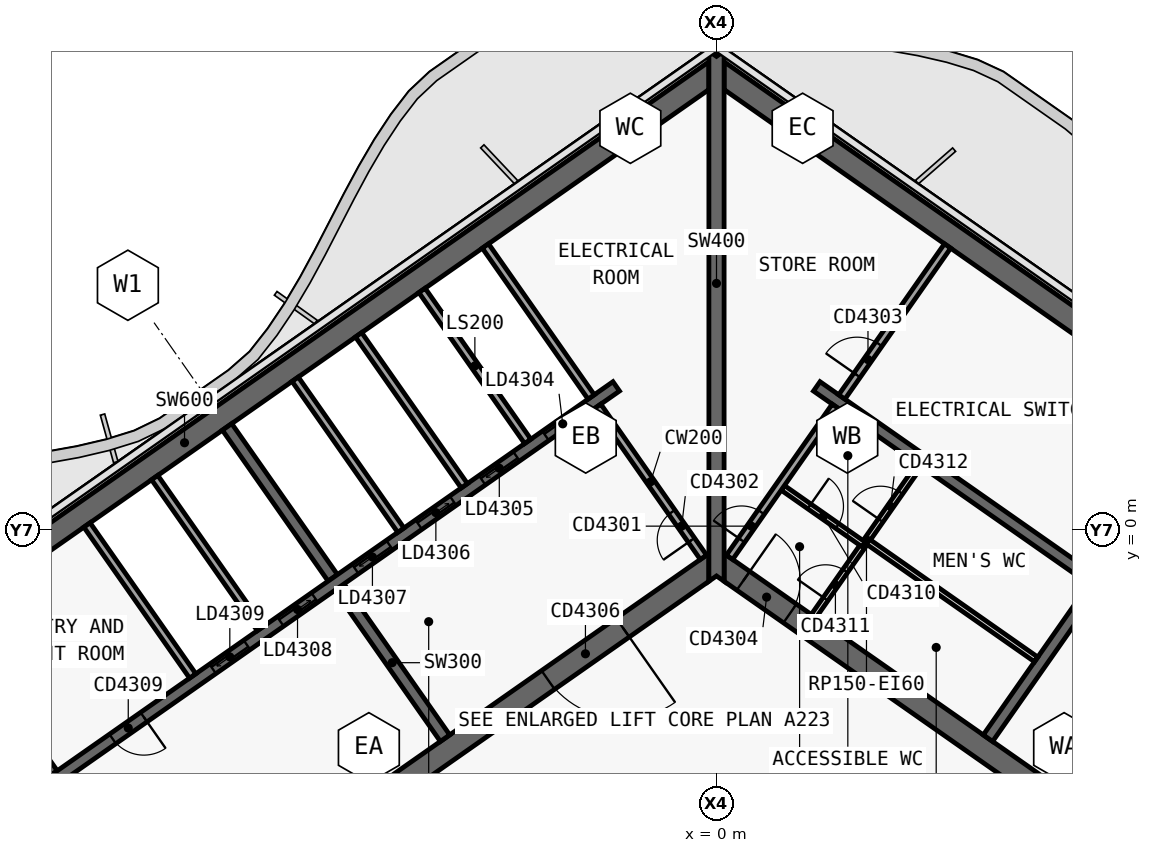
"""IFC4 building model, lengths in metres.
Left out: names, types, materials, properties, quantities, classifications, styles, units other than length and angle.
Written with IfcOpenShell. Run it as: python <this file> out.ifc"""

import sys

from ifc_helpers import new_model, si_unit, direction, frame, frame_2d, origin, place, context, subcontext, project, spatial, polyline, rectangle, outline, extrude, element, fill, save


model = new_model("IFC4")
c1 = context("Model", 3, precision=1e-05, world=origin(), true_north=direction((0.0, 1.0)))
c2 = subcontext(c1, "Body", "Model", "MODEL_VIEW")
j1 = project(units=[si_unit("LENGTHUNIT", "METRE"), si_unit("PLANEANGLEUNIT", "RADIAN")], contexts=[c1])
p1 = place(None, origin())
s1 = spatial("IfcSite", under=j1, at=p1, CompositionType="ELEMENT")
p2 = place(p1, origin())
s2 = spatial("IfcBuilding", under=s1, at=p2, CompositionType="ELEMENT")
p3 = place(p2, frame((0.0, 0.0, 241.0)))
s3 = spatial("IfcBuildingStorey", under=s2, at=p3, CompositionType="ELEMENT", Elevation=241.0)
p4 = place(p3, frame((-0.028, 12.066, 0.0), z_axis=(0.0, 0.0, 1.0), x_axis=(-0.819151382952, -0.573577380837, 0.0)))
e1 = element("IfcWall", 1, at=p4, inside=s3, PredefinedType="SHEAR", context=c2, shape_type="SweptSolid", body=[
    extrude(outline(polyline([(33.898, 0.3), (0.42, 0.3), (0.0, -0.3), (33.898, -0.3), (33.898, 0.3)])), origin(), (0.0, 0.0, 1.0), 3.9),
])
p5 = place(p3, frame((-0.028, -0.874, 0.0), z_axis=(0.0, 0.0, 1.0), x_axis=(-0.819150035022, -0.573579305871, 0.0)))
e2 = element("IfcWall", 2, at=p5, inside=s3, PredefinedType="SHEAR", context=c2, shape_type="SweptSolid", body=[
    extrude(outline(polyline([(26.476, 0.3), (0.42, 0.3), (0.0, -0.3), (26.476, -0.3), (26.476, 0.3)])), origin(), (0.0, 0.0, 1.0), 3.9),
])
p6 = place(p5, frame((2.976, 0.0, 0.0)))
e3 = element("IfcOpeningElement", 3, at=p6, cuts=e2, PredefinedType="OPENING", context=c2, shape_type="SweptSolid", body=[
    extrude(rectangle(XDim=2.4, YDim=2.1, at=frame_2d((1.2, 1.05))), frame((0.0, 0.31, 0.0), z_axis=(0.0, -1.0, 0.0), x_axis=(1.0, 0.0, 0.0)), (0.0, 0.0, 1.0), 0.62),
])
p7 = place(p5, frame((11.776, 0.0, 0.0)))
e4 = element("IfcOpeningElement", 4, at=p7, cuts=e2, PredefinedType="OPENING", context=c2, shape_type="SweptSolid", body=[
    extrude(rectangle(XDim=2.4, YDim=2.1, at=frame_2d((1.2, 1.05))), frame((0.0, 0.31, 0.0), z_axis=(0.0, -1.0, 0.0), x_axis=(1.0, 0.0, 0.0)), (0.0, 0.0, 1.0), 0.62),
])
p8 = place(p3, frame((-7.143, -5.49, 0.0), z_axis=(0.0, 0.0, 1.0), x_axis=(-0.573617744349, 0.819123118565, 0.0)))
e5 = element("IfcWall", 5, at=p8, inside=s3, PredefinedType="SHEAR", context=c2, shape_type="SweptSolid", body=[
    extrude(outline(polyline([(4.85, 0.15), (0.0, 0.15), (0.0, -0.15), (4.85, -0.15), (4.85, 0.15)])), origin(), (0.0, 0.0, 1.0), 3.9),
])
p9 = place(p3, frame((-10.097, -1.271, 0.0), z_axis=(0.0, 0.0, 1.0), x_axis=(-0.573560315113, 0.819163332265, 0.0)))
e6 = element("IfcWall", 6, at=p9, inside=s3, PredefinedType="SHEAR", context=c2, shape_type="SweptSolid", body=[
    extrude(outline(polyline([(4.85, -0.15), (4.85, 0.15), (0.0, 0.15), (0.0, -0.15), (4.85, -0.15)])), origin(), (0.0, 0.0, 1.0), 3.9),
])
p10 = place(p3, frame((-17.469, -6.433, 0.0), z_axis=(0.0, 0.0, 1.0), x_axis=(-0.573594092424, 0.81913968109, 0.0)))
e7 = element("IfcWall", 7, at=p10, inside=s3, PredefinedType="SHEAR", context=c2, shape_type="SweptSolid", body=[
    extrude(outline(polyline([(4.85, -0.15), (4.85, 0.15), (0.0, 0.15), (0.0, -0.15), (4.85, -0.15)])), origin(), (0.0, 0.0, 1.0), 3.9),
])
p11 = place(p3, frame((-2.638, 3.768, 0.0), z_axis=(0.0, 0.0, 1.0), x_axis=(-0.819155014212, -0.573572194837, 0.0)))
e8 = element("IfcWall", 8, at=p11, inside=s3, PredefinedType="SHEAR", context=c2, shape_type="SweptSolid", body=[
    extrude(outline(polyline([(26.4, 0.15), (0.0, 0.15), (0.0, -0.15), (26.4, -0.15), (26.4, 0.15)])), origin(), (0.0, 0.0, 1.0), 3.9),
])
p12 = place(p11, frame((1.169, 0.0, 0.0)))
e9 = element("IfcOpeningElement", 9, at=p12, cuts=e8, PredefinedType="OPENING", context=c2, shape_type="SweptSolid", body=[
    extrude(rectangle(XDim=1.1, YDim=2.1, at=frame_2d((0.55, 1.05))), frame((0.0, 0.16, 0.0), z_axis=(0.0, -1.0, 0.0), x_axis=(1.0, 0.0, 0.0)), (0.0, 0.0, 1.0), 0.32),
])
p13 = place(p11, frame((3.206, 0.0, 0.0)))
e10 = element("IfcOpeningElement", 10, at=p13, cuts=e8, PredefinedType="OPENING", context=c2, shape_type="SweptSolid", body=[
    extrude(rectangle(XDim=1.1, YDim=2.1, at=frame_2d((0.55, 1.05))), frame((0.0, 0.16, 0.0), z_axis=(0.0, -1.0, 0.0), x_axis=(1.0, 0.0, 0.0)), (0.0, 0.0, 1.0), 0.32),
])
p14 = place(p11, frame((5.244, 0.0, 0.0)))
e11 = element("IfcOpeningElement", 11, at=p14, cuts=e8, PredefinedType="OPENING", context=c2, shape_type="SweptSolid", body=[
    extrude(rectangle(XDim=1.1, YDim=2.1, at=frame_2d((0.55, 1.05))), frame((0.0, 0.16, 0.0), z_axis=(0.0, -1.0, 0.0), x_axis=(1.0, 0.0, 0.0)), (0.0, 0.0, 1.0), 0.32),
])
p15 = place(p11, frame((7.281, 0.0, 0.0)))
e12 = element("IfcOpeningElement", 12, at=p15, cuts=e8, PredefinedType="OPENING", context=c2, shape_type="SweptSolid", body=[
    extrude(rectangle(XDim=1.1, YDim=2.1, at=frame_2d((0.55, 1.05))), frame((0.0, 0.16, 0.0), z_axis=(0.0, -1.0, 0.0), x_axis=(1.0, 0.0, 0.0)), (0.0, 0.0, 1.0), 0.32),
])
p16 = place(p11, frame((9.688, 0.0, 0.0)))
e13 = element("IfcOpeningElement", 13, at=p16, cuts=e8, PredefinedType="OPENING", context=c2, shape_type="SweptSolid", body=[
    extrude(rectangle(XDim=1.1, YDim=2.1, at=frame_2d((0.55, 1.05))), frame((0.0, 0.16, 0.0), z_axis=(0.0, -1.0, 0.0), x_axis=(1.0, 0.0, 0.0)), (0.0, 0.0, 1.0), 0.32),
])
p17 = place(p11, frame((11.863, 0.0, 0.0)))
e14 = element("IfcOpeningElement", 14, at=p17, cuts=e8, PredefinedType="OPENING", context=c2, shape_type="SweptSolid", body=[
    extrude(rectangle(XDim=1.1, YDim=2.1, at=frame_2d((0.55, 1.05))), frame((0.0, 0.16, 0.0), z_axis=(0.0, -1.0, 0.0), x_axis=(1.0, 0.0, 0.0)), (0.0, 0.0, 1.0), 0.32),
])
p18 = place(p11, frame((15.175, 0.0, 0.0)))
e15 = element("IfcOpeningElement", 15, at=p18, cuts=e8, PredefinedType="OPENING", context=c2, shape_type="SweptSolid", body=[
    extrude(rectangle(XDim=1.0, YDim=2.1, at=frame_2d((0.5, 1.05))), frame((0.0, 0.16, 0.0), z_axis=(0.0, -1.0, 0.0), x_axis=(1.0, 0.0, 0.0)), (0.0, 0.0, 1.0), 0.32),
])
p19 = place(p3, frame((0.028, 12.066, 0.0), z_axis=(0.0, 0.0, 1.0), x_axis=(0.819151382952, -0.573577380837, 0.0)))
e16 = element("IfcWall", 16, at=p19, inside=s3, PredefinedType="SHEAR", context=c2, shape_type="SweptSolid", body=[
    extrude(outline(polyline([(33.898, 0.3), (0.0, 0.3), (0.42, -0.3), (33.898, -0.3), (33.898, 0.3)])), origin(), (0.0, 0.0, 1.0), 3.9),
])
p20 = place(p3, frame((0.028, -0.874, 0.0), z_axis=(0.0, 0.0, 1.0), x_axis=(0.819150035022, -0.573579305871, 0.0)))
e17 = element("IfcWall", 17, at=p20, inside=s3, PredefinedType="SHEAR", context=c2, shape_type="SweptSolid", body=[
    extrude(outline(polyline([(26.476, 0.3), (0.0, 0.3), (0.42, -0.3), (26.476, -0.3), (26.476, 0.3)])), origin(), (0.0, 0.0, 1.0), 3.9),
])
p21 = place(p20, frame((0.826, 0.0, 0.0)))
e18 = element("IfcOpeningElement", 18, at=p21, cuts=e17, PredefinedType="OPENING", context=c2, shape_type="SweptSolid", body=[
    extrude(rectangle(XDim=1.5, YDim=2.1, at=frame_2d((0.75, 1.05))), frame((0.0, 0.31, 0.0), z_axis=(0.0, -1.0, 0.0), x_axis=(1.0, 0.0, 0.0)), (0.0, 0.0, 1.0), 0.62),
])
p22 = place(p20, frame((12.226, 0.0, 0.0)))
e19 = element("IfcOpeningElement", 19, at=p22, cuts=e17, PredefinedType="OPENING", context=c2, shape_type="SweptSolid", body=[
    extrude(rectangle(XDim=1.5, YDim=2.1, at=frame_2d((0.75, 1.05))), frame((0.0, 0.31, 0.0), z_axis=(0.0, -1.0, 0.0), x_axis=(1.0, 0.0, 0.0)), (0.0, 0.0, 1.0), 0.62),
])
p23 = place(p3, frame((7.143, -5.49, 0.0), z_axis=(0.0, 0.0, 1.0), x_axis=(0.573617744349, 0.819123118565, 0.0)))
e20 = element("IfcWall", 20, at=p23, inside=s3, PredefinedType="SHEAR", context=c2, shape_type="SweptSolid", body=[
    extrude(outline(polyline([(0.0, 0.15), (0.0, -0.15), (4.85, -0.15), (4.85, 0.15), (0.0, 0.15)])), origin(), (0.0, 0.0, 1.0), 3.9),
])
p24 = place(p3, frame((2.638, 3.768, 0.0), z_axis=(0.0, 0.0, 1.0), x_axis=(0.819155014212, -0.573572194837, 0.0)))
e21 = element("IfcWall", 21, at=p24, inside=s3, PredefinedType="SHEAR", context=c2, shape_type="SweptSolid", body=[
    extrude(outline(polyline([(0.0, 0.15), (0.0, -0.15), (26.4, -0.15), (26.4, 0.15), (0.0, 0.15)])), origin(), (0.0, 0.0, 1.0), 3.9),
])
p25 = place(p24, frame((9.637, 0.0, 0.0)))
e22 = element("IfcOpeningElement", 22, at=p25, cuts=e21, PredefinedType="OPENING", context=c2, shape_type="SweptSolid", body=[
    extrude(rectangle(XDim=1.2, YDim=2.1, at=frame_2d((0.6, 1.05))), frame((0.0, 0.16, 0.0), z_axis=(0.0, -1.0, 0.0), x_axis=(1.0, 0.0, 0.0)), (0.0, 0.0, 1.0), 0.32),
])
p26 = place(p24, frame((11.812, 0.0, 0.0)))
e23 = element("IfcOpeningElement", 23, at=p26, cuts=e21, PredefinedType="OPENING", context=c2, shape_type="SweptSolid", body=[
    extrude(rectangle(XDim=1.2, YDim=2.1, at=frame_2d((0.6, 1.05))), frame((0.0, 0.16, 0.0), z_axis=(0.0, -1.0, 0.0), x_axis=(1.0, 0.0, 0.0)), (0.0, 0.0, 1.0), 0.32),
])
p27 = place(p24, frame((13.988, 0.0, 0.0)))
e24 = element("IfcOpeningElement", 24, at=p27, cuts=e21, PredefinedType="OPENING", context=c2, shape_type="SweptSolid", body=[
    extrude(rectangle(XDim=1.2, YDim=2.1, at=frame_2d((0.6, 1.05))), frame((0.0, 0.16, 0.0), z_axis=(0.0, -1.0, 0.0), x_axis=(1.0, 0.0, 0.0)), (0.0, 0.0, 1.0), 0.32),
])
p28 = place(p24, frame((16.262, 0.0, 0.0)))
e25 = element("IfcOpeningElement", 25, at=p28, cuts=e21, PredefinedType="OPENING", context=c2, shape_type="SweptSolid", body=[
    extrude(rectangle(XDim=1.0, YDim=2.1, at=frame_2d((0.5, 1.05))), frame((0.0, 0.16, 0.0), z_axis=(0.0, -1.0, 0.0), x_axis=(1.0, 0.0, 0.0)), (0.0, 0.0, 1.0), 0.32),
])
p29 = place(p3, frame((0.0, -1.361, 0.0), z_axis=(0.0, 0.0, 1.0), x_axis=(0.0, 1.0, 0.0)))
e26 = element("IfcWall", 26, at=p29, inside=s3, PredefinedType="SHEAR", context=c2, shape_type="SweptSolid", body=[
    extrude(outline(polyline([(0.14, 0.2), (0.0, 0.2), (0.14, 0.0), (0.0, -0.2), (0.14, -0.2), (1.012, -0.2), (12.94, -0.2), (13.813, -0.2), (13.893, -0.2), (13.933, -0.172), (13.813, 0.0), (13.933, 0.172), (13.893, 0.2), (13.813, 0.2), (12.94, 0.2), (1.012, 0.2), (0.14, 0.2)])), origin(), (0.0, 0.0, 1.0), 3.9),
])
p30 = place(p3, frame((-4.967, 2.321, 0.0), z_axis=(0.0, 0.0, 1.0), x_axis=(-0.573594092424, 0.81913968109, 0.0)))
e27 = element("IfcWall", 27, at=p30, inside=s3, PredefinedType="SOLIDWALL", context=c2, shape_type="SweptSolid", body=[
    extrude(rectangle(XDim=4.85, YDim=0.2, at=frame_2d((2.425, 0.0))), origin(), (0.0, 0.0, 1.0), 3.9),
])
p31 = place(p3, frame((-6.636, 1.152, 0.0), z_axis=(0.0, 0.0, 1.0), x_axis=(-0.573560315113, 0.819163332265, 0.0)))
e28 = element("IfcWall", 28, at=p31, inside=s3, PredefinedType="SOLIDWALL", context=c2, shape_type="SweptSolid", body=[
    extrude(rectangle(XDim=4.85, YDim=0.2, at=frame_2d((2.425, 0.0))), origin(), (0.0, 0.0, 1.0), 3.9),
])
p32 = place(p3, frame((-8.305, -0.017, 0.0), z_axis=(0.0, 0.0, 1.0), x_axis=(-0.573594092424, 0.81913968109, 0.0)))
e29 = element("IfcWall", 29, at=p32, inside=s3, PredefinedType="SOLIDWALL", context=c2, shape_type="SweptSolid", body=[
    extrude(rectangle(XDim=4.85, YDim=0.2, at=frame_2d((2.425, 0.0))), origin(), (0.0, 0.0, 1.0), 3.9),
])
p33 = place(p3, frame((-12.001, -2.605, 0.0), z_axis=(0.0, 0.0, 1.0), x_axis=(-0.573560315113, 0.819163332265, 0.0)))
e30 = element("IfcWall", 30, at=p33, inside=s3, PredefinedType="SOLIDWALL", context=c2, shape_type="SweptSolid", body=[
    extrude(rectangle(XDim=4.85, YDim=0.2, at=frame_2d((2.425, 0.0))), origin(), (0.0, 0.0, 1.0), 3.9),
])
p34 = place(p3, frame((-13.783, -3.852, 0.0), z_axis=(0.0, 0.0, 1.0), x_axis=(-0.573594092424, 0.81913968109, 0.0)))
e31 = element("IfcWall", 31, at=p34, inside=s3, PredefinedType="SOLIDWALL", context=c2, shape_type="SweptSolid", body=[
    extrude(rectangle(XDim=4.85, YDim=0.2, at=frame_2d((2.425, 0.0))), origin(), (0.0, 0.0, 1.0), 3.9),
])
p35 = place(p3, frame((2.556, -2.278, 0.0), z_axis=(0.0, 0.0, 1.0), x_axis=(0.573560315113, 0.819163332265, 0.0)))
e32 = element("IfcWall", 32, at=p35, inside=s3, PredefinedType="PARTITIONING", context=c2, shape_type="SweptSolid", body=[
    extrude(rectangle(XDim=4.85, YDim=0.15, at=frame_2d((2.425, 0.0))), origin(), (0.0, 0.0, 1.0), 3.62),
])
p36 = place(p35, frame((0.55, 0.0, 0.0)))
e33 = element("IfcOpeningElement", 33, at=p36, cuts=e32, PredefinedType="OPENING", context=c2, shape_type="SweptSolid", body=[
    extrude(rectangle(XDim=0.9, YDim=2.1, at=frame_2d((0.45, 1.05))), frame((0.0, 0.085, 0.0), z_axis=(0.0, -1.0, 0.0), x_axis=(1.0, 0.0, 0.0)), (0.0, 0.0, 1.0), 0.17),
])
p37 = place(p35, frame((3.075, 0.0, 0.0)))
e34 = element("IfcOpeningElement", 34, at=p37, cuts=e32, PredefinedType="OPENING", context=c2, shape_type="SweptSolid", body=[
    extrude(rectangle(XDim=0.9, YDim=2.1, at=frame_2d((0.45, 1.05))), frame((0.0, 0.085, 0.0), z_axis=(0.0, -1.0, 0.0), x_axis=(1.0, 0.0, 0.0)), (0.0, 0.0, 1.0), 0.17),
])
p38 = place(p3, frame((1.745, 1.097, 0.0), z_axis=(0.0, 0.0, 1.0), x_axis=(0.819178980414, -0.573537965655, 0.0)))
e35 = element("IfcWall", 35, at=p38, inside=s3, PredefinedType="PARTITIONING", context=c2, shape_type="SweptSolid", body=[
    extrude(rectangle(XDim=2.6, YDim=0.15, at=frame_2d((1.3, 0.0))), origin(), (0.0, 0.0, 1.0), 3.62),
])
p39 = place(p38, frame((0.85, 0.0, 0.0)))
e36 = element("IfcOpeningElement", 36, at=p39, cuts=e35, PredefinedType="OPENING", context=c2, shape_type="SweptSolid", body=[
    extrude(rectangle(XDim=0.9, YDim=2.1, at=frame_2d((0.45, 1.05))), frame((0.0, 0.085, 0.0), z_axis=(0.0, -1.0, 0.0), x_axis=(1.0, 0.0, 0.0)), (0.0, 0.0, 1.0), 0.17),
])
p40 = place(p3, frame((3.947, -0.292, 0.0), z_axis=(0.0, 0.0, 1.0), x_axis=(0.819151939971, -0.573576585332, 0.0)))
e37 = element("IfcWall", 37, at=p40, inside=s3, PredefinedType="PARTITIONING", context=c2, shape_type="SweptSolid", body=[
    extrude(rectangle(XDim=5.45, YDim=0.15, at=frame_2d((2.725, 0.0))), origin(), (0.0, 0.0, 1.0), 3.62),
])
p41 = place(p3, frame((-0.344, -0.729, 0.0), z_axis=(0.0, 0.0, 1.0), x_axis=(-0.573560315113, 0.819163332265, 0.0)))
e38 = element("IfcWall", 38, at=p41, inside=s3, PredefinedType="SOLIDWALL", context=c2, shape_type="SweptSolid", body=[
    extrude(rectangle(XDim=4.85, YDim=0.2, at=frame_2d((2.425, 0.0))), origin(), (0.0, 0.0, 1.0), 3.62),
])
p42 = place(p41, frame((0.55, 0.0, 0.0)))
e39 = element("IfcOpeningElement", 39, at=p42, cuts=e38, PredefinedType="OPENING", context=c2, shape_type="SweptSolid", body=[
    extrude(rectangle(XDim=0.9, YDim=2.1, at=frame_2d((0.45, 1.05))), frame((0.0, 0.11, 0.0), z_axis=(0.0, -1.0, 0.0), x_axis=(1.0, 0.0, 0.0)), (0.0, 0.0, 1.0), 0.22),
])
p43 = place(p3, frame((-3.298, 3.49, 0.0), z_axis=(0.0, 0.0, 1.0), x_axis=(-0.573560315113, 0.819163332265, 0.0)))
e40 = element("IfcWall", 40, at=p43, inside=s3, PredefinedType="SOLIDWALL", context=c2, shape_type="SweptSolid", body=[
    extrude(rectangle(XDim=4.85, YDim=0.2, at=frame_2d((2.425, 0.0))), origin(), (0.0, 0.0, 1.0), 3.62),
])
p44 = place(p3, frame((0.344, -0.729, 0.0), z_axis=(0.0, 0.0, 1.0), x_axis=(0.573560315113, 0.819163332265, 0.0)))
e41 = element("IfcWall", 41, at=p44, inside=s3, PredefinedType="SOLIDWALL", context=c2, shape_type="SweptSolid", body=[
    extrude(rectangle(XDim=4.85, YDim=0.2, at=frame_2d((2.425, 0.0))), origin(), (0.0, 0.0, 1.0), 3.62),
])
p45 = place(p44, frame((0.55, 0.0, 0.0)))
e42 = element("IfcOpeningElement", 42, at=p45, cuts=e41, PredefinedType="OPENING", context=c2, shape_type="SweptSolid", body=[
    extrude(rectangle(XDim=0.9, YDim=2.1, at=frame_2d((0.45, 1.05))), frame((0.0, 0.11, 0.0), z_axis=(0.0, -1.0, 0.0), x_axis=(1.0, 0.0, 0.0)), (0.0, 0.0, 1.0), 0.22),
])
p46 = place(p3, frame((3.298, 3.49, 0.0), z_axis=(0.0, 0.0, 1.0), x_axis=(0.573560315113, 0.819163332265, 0.0)))
e43 = element("IfcWall", 43, at=p46, inside=s3, PredefinedType="SOLIDWALL", context=c2, shape_type="SweptSolid", body=[
    extrude(rectangle(XDim=4.85, YDim=0.2, at=frame_2d((2.425, 0.0))), origin(), (0.0, 0.0, 1.0), 3.62),
])
p47 = place(p46, frame((0.7, 0.0, 0.0)))
e44 = element("IfcOpeningElement", 44, at=p47, cuts=e43, PredefinedType="OPENING", context=c2, shape_type="SweptSolid", body=[
    extrude(rectangle(XDim=1.0, YDim=2.1, at=frame_2d((0.5, 1.05))), frame((0.0, 0.11, 0.0), z_axis=(0.0, -1.0, 0.0), x_axis=(1.0, 0.0, 0.0)), (0.0, 0.0, 1.0), 0.22),
])
p48 = place(p12, origin())
e45 = element("IfcDoor", 45, at=p48, inside=s3, OperationType="SLIDING_TO_LEFT", PredefinedType="DOOR", context=c2, shape_type="SweptSolid", body=[
    extrude(rectangle(XDim=1.1, YDim=2.1, at=frame_2d((0.55, 1.05))), frame((0.0, 0.025, 0.0), z_axis=(0.0, -1.0, 0.0), x_axis=(1.0, 0.0, 0.0)), (0.0, 0.0, 1.0), 0.05),
])
fill(e9, e45)
p49 = place(p13, origin())
e46 = element("IfcDoor", 46, at=p49, inside=s3, OperationType="SLIDING_TO_RIGHT", PredefinedType="DOOR", context=c2, shape_type="SweptSolid", body=[
    extrude(rectangle(XDim=1.1, YDim=2.1, at=frame_2d((0.55, 1.05))), frame((0.0, 0.025, 0.0), z_axis=(0.0, -1.0, 0.0), x_axis=(1.0, 0.0, 0.0)), (0.0, 0.0, 1.0), 0.05),
])
fill(e10, e46)
p50 = place(p14, origin())
e47 = element("IfcDoor", 47, at=p50, inside=s3, OperationType="SLIDING_TO_LEFT", PredefinedType="DOOR", context=c2, shape_type="SweptSolid", body=[
    extrude(rectangle(XDim=1.1, YDim=2.1, at=frame_2d((0.55, 1.05))), frame((0.0, 0.025, 0.0), z_axis=(0.0, -1.0, 0.0), x_axis=(1.0, 0.0, 0.0)), (0.0, 0.0, 1.0), 0.05),
])
fill(e11, e47)
p51 = place(p15, origin())
e48 = element("IfcDoor", 48, at=p51, inside=s3, OperationType="SLIDING_TO_RIGHT", PredefinedType="DOOR", context=c2, shape_type="SweptSolid", body=[
    extrude(rectangle(XDim=1.1, YDim=2.1, at=frame_2d((0.55, 1.05))), frame((0.0, 0.025, 0.0), z_axis=(0.0, -1.0, 0.0), x_axis=(1.0, 0.0, 0.0)), (0.0, 0.0, 1.0), 0.05),
])
fill(e12, e48)
p52 = place(p16, origin())
e49 = element("IfcDoor", 49, at=p52, inside=s3, OperationType="SLIDING_TO_LEFT", PredefinedType="DOOR", context=c2, shape_type="SweptSolid", body=[
    extrude(rectangle(XDim=1.1, YDim=2.1, at=frame_2d((0.55, 1.05))), frame((0.0, 0.025, 0.0), z_axis=(0.0, -1.0, 0.0), x_axis=(1.0, 0.0, 0.0)), (0.0, 0.0, 1.0), 0.05),
])
fill(e13, e49)
p53 = place(p17, origin())
e50 = element("IfcDoor", 50, at=p53, inside=s3, OperationType="SLIDING_TO_RIGHT", PredefinedType="DOOR", context=c2, shape_type="SweptSolid", body=[
    extrude(rectangle(XDim=1.1, YDim=2.1, at=frame_2d((0.55, 1.05))), frame((0.0, 0.025, 0.0), z_axis=(0.0, -1.0, 0.0), x_axis=(1.0, 0.0, 0.0)), (0.0, 0.0, 1.0), 0.05),
])
fill(e14, e50)
p54 = place(p18, origin())
e51 = element("IfcDoor", 51, at=p54, inside=s3, OperationType="SINGLE_SWING_RIGHT", PredefinedType="DOOR", context=c2, shape_type="SweptSolid", body=[
    extrude(rectangle(XDim=1.0, YDim=2.1, at=frame_2d((0.5, 1.05))), frame((0.0, 0.025, 0.0), z_axis=(0.0, -1.0, 0.0), x_axis=(1.0, 0.0, 0.0)), (0.0, 0.0, 1.0), 0.05),
])
fill(e15, e51)
p55 = place(p6, origin())
e52 = element("IfcDoor", 52, at=p55, inside=s3, OperationType="DOUBLE_DOOR_SINGLE_SWING", PredefinedType="DOOR", context=c2, shape_type="SweptSolid", body=[
    extrude(rectangle(XDim=2.4, YDim=2.1, at=frame_2d((1.2, 1.05))), frame((0.0, 0.025, 0.0), z_axis=(0.0, -1.0, 0.0), x_axis=(1.0, 0.0, 0.0)), (0.0, 0.0, 1.0), 0.05),
])
fill(e3, e52)
p56 = place(p36, origin())
e53 = element("IfcDoor", 53, at=p56, inside=s3, OperationType="SINGLE_SWING_RIGHT", PredefinedType="DOOR", context=c2, shape_type="SweptSolid", body=[
    extrude(rectangle(XDim=0.9, YDim=2.1, at=frame_2d((0.45, 1.05))), frame((0.0, 0.025, 0.0), z_axis=(0.0, -1.0, 0.0), x_axis=(1.0, 0.0, 0.0)), (0.0, 0.0, 1.0), 0.05),
])
fill(e33, e53)
p57 = place(p39, origin())
e54 = element("IfcDoor", 54, at=p57, inside=s3, OperationType="SINGLE_SWING_RIGHT", PredefinedType="DOOR", context=c2, shape_type="SweptSolid", body=[
    extrude(rectangle(XDim=0.9, YDim=2.1, at=frame_2d((0.45, 1.05))), frame((0.0, 0.025, 0.0), z_axis=(0.0, -1.0, 0.0), x_axis=(1.0, 0.0, 0.0)), (0.0, 0.0, 1.0), 0.05),
])
fill(e36, e54)
p58 = place(p37, origin())
e55 = element("IfcDoor", 55, at=p58, inside=s3, OperationType="SINGLE_SWING_RIGHT", PredefinedType="DOOR", context=c2, shape_type="SweptSolid", body=[
    extrude(rectangle(XDim=0.9, YDim=2.1, at=frame_2d((0.45, 1.05))), frame((0.0, 0.025, 0.0), z_axis=(0.0, -1.0, 0.0), x_axis=(1.0, 0.0, 0.0)), (0.0, 0.0, 1.0), 0.05),
])
fill(e34, e55)
p59 = place(p21, origin())
e56 = element("IfcDoor", 56, at=p59, inside=s3, OperationType="SINGLE_SWING_RIGHT", PredefinedType="DOOR", context=c2, shape_type="SweptSolid", body=[
    extrude(rectangle(XDim=1.5, YDim=2.1, at=frame_2d((0.75, 1.05))), frame((0.0, 0.025, 0.0), z_axis=(0.0, -1.0, 0.0), x_axis=(1.0, 0.0, 0.0)), (0.0, 0.0, 1.0), 0.05),
])
fill(e18, e56)
p60 = place(p42, origin())
e57 = element("IfcDoor", 57, at=p60, inside=s3, OperationType="SINGLE_SWING_RIGHT", PredefinedType="DOOR", context=c2, shape_type="SweptSolid", body=[
    extrude(rectangle(XDim=0.9, YDim=2.1, at=frame_2d((0.45, 1.05))), frame((0.0, 0.025, 0.0), z_axis=(0.0, -1.0, 0.0), x_axis=(1.0, 0.0, 0.0)), (0.0, 0.0, 1.0), 0.05),
])
fill(e39, e57)
p61 = place(p45, origin())
e58 = element("IfcDoor", 58, at=p61, inside=s3, OperationType="SINGLE_SWING_RIGHT", PredefinedType="DOOR", context=c2, shape_type="SweptSolid", body=[
    extrude(rectangle(XDim=0.9, YDim=2.1, at=frame_2d((0.45, 1.05))), frame((0.0, 0.025, 0.0), z_axis=(0.0, -1.0, 0.0), x_axis=(1.0, 0.0, 0.0)), (0.0, 0.0, 1.0), 0.05),
])
fill(e42, e58)
p62 = place(p47, origin())
e59 = element("IfcDoor", 59, at=p62, inside=s3, OperationType="SINGLE_SWING_RIGHT", PredefinedType="DOOR", context=c2, shape_type="SweptSolid", body=[
    extrude(rectangle(XDim=1.0, YDim=2.1, at=frame_2d((0.5, 1.05))), frame((0.0, 0.025, 0.0), z_axis=(0.0, -1.0, 0.0), x_axis=(1.0, 0.0, 0.0)), (0.0, 0.0, 1.0), 0.05),
])
fill(e44, e59)
save(model, sys.argv[1])
